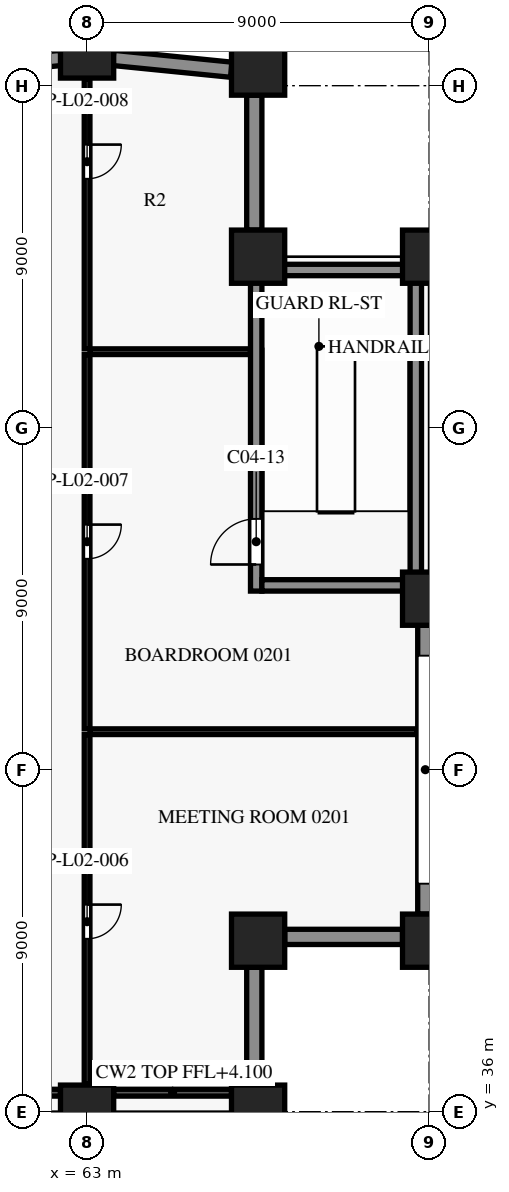
"""IFC4 building model, lengths in metres.
Left out: names, types, materials, properties, quantities, classifications, styles, units other than length and angle.
Written with IfcOpenShell. Run it as: python <this file> out.ifc"""

import sys

from ifc_helpers import new_model, si_unit, direction, frame, frame_2d, origin, origin_2d, place, context, subcontext, project, spatial, rectangle, extrude, element, fill, save


model = new_model("IFC4")
c1 = context("Model", 3, precision=1e-05, world=origin(), true_north=direction((0.0, 1.0)))
c2 = subcontext(c1, "Body", "Model", "MODEL_VIEW")
j1 = project(units=[si_unit("LENGTHUNIT", "METRE"), si_unit("PLANEANGLEUNIT", "RADIAN")], contexts=[c1])
p1 = place(None, origin())
s1 = spatial("IfcSite", under=j1, at=p1, CompositionType="ELEMENT")
p2 = place(p1, origin())
s2 = spatial("IfcBuilding", under=s1, at=p2, CompositionType="ELEMENT")
p3 = place(p2, frame((0.0, 0.0, 14.5)))
s3 = spatial("IfcBuildingStorey", under=s2, at=p3, CompositionType="ELEMENT", Elevation=14.5)
for number, where, z_axis, x_axis in (
    (1, (63.0, 36.0, 0.0), (0.0, 0.0, 1.0), (1.0, 0.0, 0.0)),
    (2, (67.5, 36.0, 0.0), (0.0, 0.0, 1.0), (1.0, 0.0, 0.0)),
    (3, (72.0, 40.5, 0.0), (0.0, 0.0, 1.0), (1.0, 0.0, 0.0)),
    (4, (72.0, 49.5, 0.0), (0.0, 0.0, 1.0), (1.0, 0.0, 0.0)),
    (5, (72.0, 58.5, 0.0), (0.0, 0.0, 1.0), (1.0, 0.0, 0.0)),
    (6, (67.5, 63.45, 0.0), (0.0, 0.0, 1.0), (1.0, 0.0, 0.0)),
    (7, (63.0, 63.9, 0.0), (0.0, 0.0, 1.0), (1.0, 0.0, 0.0)),
    (8, (67.5, 40.5, 0.0), (0.0, 0.0, 1.0), (1.0, 0.0, 0.0)),
    (9, (67.5, 58.5, 0.0), (0.0, 0.0, 1.0), (1.0, 0.0, 0.0)),
):
    element("IfcColumn", number, at=place(p3, frame(where, z_axis=z_axis, x_axis=x_axis)), inside=s3, PredefinedType="COLUMN", context=c2, shape_type="SweptSolid", body=[
        extrude(rectangle(XDim=1.4, YDim=1.4, at=origin_2d()), origin(), (0.0, 0.0, 1.0), 5.0),
    ])
for number, where, z_axis, x_axis in (
    (10, (67.4, 39.8, 0.0), (0.0, 0.0, 1.0), (0.0, -1.0, 0.0)),
    (11, (71.3, 40.6, 0.0), (0.0, 0.0, 1.0), (-1.0, 0.0, 0.0)),
):
    element("IfcWall", number, at=place(p3, frame(where, z_axis=z_axis, x_axis=x_axis)), inside=s3, PredefinedType="SOLIDWALL", context=c2, shape_type="SweptSolid", body=[
        extrude(rectangle(XDim=3.1, YDim=0.4, at=frame_2d((1.55, 0.0))), origin(), (0.0, 0.0, 1.0), 4.1),
    ])
p4 = place(p3, frame((71.9, 48.8, 0.0), z_axis=(0.0, 0.0, 1.0), x_axis=(0.0, -1.0, 0.0)))
e12 = element("IfcWall", 12, at=p4, inside=s3, PredefinedType="SOLIDWALL", context=c2, shape_type="SweptSolid", body=[
    extrude(rectangle(XDim=7.6, YDim=0.4, at=frame_2d((3.8, 0.0))), origin(), (0.0, 0.0, 1.0), 4.1),
])
p5 = place(p4, frame((0.8, 0.0, 0.9)))
e13 = element("IfcOpeningElement", 13, at=p5, cuts=e12, PredefinedType="OPENING", context=c2, shape_type="SweptSolid", body=[
    extrude(rectangle(XDim=6.0, YDim=1.8, at=frame_2d((3.0, 0.9))), frame((0.0, 0.21, 0.0), z_axis=(0.0, -1.0, 0.0), x_axis=(1.0, 0.0, 0.0)), (0.0, 0.0, 1.0), 0.42),
])
p6 = place(p3, frame((67.4, 62.75, 0.0), z_axis=(0.0, 0.0, 1.0), x_axis=(0.0, -1.0, 0.0)))
e14 = element("IfcWall", 14, at=p6, inside=s3, PredefinedType="SOLIDWALL", context=c2, shape_type="SweptSolid", body=[
    extrude(rectangle(XDim=3.55, YDim=0.4, at=frame_2d((1.775, 0.0))), origin(), (0.0, 0.0, 1.0), 4.1),
])
p7 = place(p3, frame((63.687, 63.731, 0.0), z_axis=(0.0, 0.0, 1.0), x_axis=(0.995041834057, -0.099457269599, 0.0)))
e15 = element("IfcWall", 15, at=p7, inside=s3, PredefinedType="SOLIDWALL", context=c2, shape_type="SweptSolid", body=[
    extrude(rectangle(XDim=3.122, YDim=0.4, at=frame_2d((1.561, 0.0))), origin(), (0.0, 0.0, 1.0), 4.1),
])
p8 = place(p3, frame((54.707, 62.97, 0.0), z_axis=(0.0, 0.0, 1.0), x_axis=(0.995039719416, 0.099478423711, 0.0)))
e16 = element("IfcWall", 16, at=p8, inside=s3, PredefinedType="SOLIDWALL", context=c2, shape_type="SweptSolid", body=[
    extrude(rectangle(XDim=7.645, YDim=0.4, at=frame_2d((3.822, 0.0))), origin(), (0.0, 0.0, 1.0), 4.1),
])
p9 = place(p8, frame((0.823, 0.0, 0.9)))
e17 = element("IfcOpeningElement", 17, at=p9, cuts=e16, PredefinedType="OPENING", context=c2, shape_type="SweptSolid", body=[
    extrude(rectangle(XDim=6.0, YDim=1.8, at=frame_2d((3.0, 0.9))), frame((0.0, 0.21, 0.0), z_axis=(0.0, -1.0, 0.0), x_axis=(1.0, 0.0, 0.0)), (0.0, 0.0, 1.0), 0.42),
])
for number, where, z_axis, x_axis in (
    (18, (67.6, 49.85, 0.0), (0.0, 0.0, 1.0), (1.0, 0.0, 0.0)),
    (19, (67.6, 58.15, 0.0), (0.0, 0.0, 1.0), (1.0, 0.0, 0.0)),
):
    element("IfcWall", number, at=place(p3, frame(where, z_axis=z_axis, x_axis=x_axis)), inside=s3, PredefinedType="SHEAR", context=c2, shape_type="SweptSolid", body=[
        extrude(rectangle(XDim=3.9, YDim=0.3, at=frame_2d((1.95, 0.0))), origin(), (0.0, 0.0, 1.0), 4.7),
    ])
p10 = place(p3, frame((67.45, 49.7, 0.0), z_axis=(0.0, 0.0, 1.0), x_axis=(0.0, 1.0, 0.0)))
e20 = element("IfcWall", 20, at=p10, inside=s3, PredefinedType="SHEAR", context=c2, shape_type="SweptSolid", body=[
    extrude(rectangle(XDim=8.6, YDim=0.3, at=frame_2d((4.3, 0.0))), origin(), (0.0, 0.0, 1.0), 4.7),
])
p11 = place(p10, frame((0.7, 0.0, 0.0)))
e21 = element("IfcOpeningElement", 21, at=p11, cuts=e20, PredefinedType="OPENING", context=c2, shape_type="SweptSolid", body=[
    extrude(rectangle(XDim=1.2, YDim=2.2, at=frame_2d((0.6, 1.1))), frame((0.0, 0.16, 0.0), z_axis=(0.0, -1.0, 0.0), x_axis=(1.0, 0.0, 0.0)), (0.0, 0.0, 1.0), 0.32),
])
p12 = place(p3, frame((71.65, 49.7, 0.0), z_axis=(0.0, 0.0, 1.0), x_axis=(0.0, 1.0, 0.0)))
e22 = element("IfcWall", 22, at=p12, inside=s3, PredefinedType="SHEAR", context=c2, shape_type="SweptSolid", body=[
    extrude(rectangle(XDim=8.6, YDim=0.3, at=frame_2d((4.3, 0.0))), origin(), (0.0, 0.0, 1.0), 4.7),
])
p13 = place(p3, frame((63.0, 45.925, 0.0), z_axis=(0.0, 0.0, 1.0), x_axis=(0.0, -1.0, 0.0)))
e23 = element("IfcWall", 23, at=p13, inside=s3, PredefinedType="PARTITIONING", context=c2, shape_type="SweptSolid", body=[
    extrude(rectangle(XDim=9.205, YDim=0.15, at=frame_2d((4.603, 0.0))), origin(), (0.0, 0.0, 1.0), 3.98),
])
p14 = place(p13, frame((4.475, 0.0, 0.0)))
e24 = element("IfcOpeningElement", 24, at=p14, cuts=e23, PredefinedType="OPENING", context=c2, shape_type="SweptSolid", body=[
    extrude(rectangle(XDim=0.9, YDim=2.1, at=frame_2d((0.45, 1.05))), frame((0.0, 0.085, 0.0), z_axis=(0.0, -1.0, 0.0), x_axis=(1.0, 0.0, 0.0)), (0.0, 0.0, 1.0), 0.17),
])
p15 = place(p3, frame((63.075, 46.0, 0.0), z_axis=(0.0, 0.0, 1.0), x_axis=(1.0, 0.0, 0.0)))
e25 = element("IfcWall", 25, at=p15, inside=s3, PredefinedType="PARTITIONING", context=c2, shape_type="SweptSolid", body=[
    extrude(rectangle(XDim=8.605, YDim=0.15, at=frame_2d((4.302, 0.0))), origin(), (0.0, 0.0, 1.0), 3.98),
])
p16 = place(p3, frame((63.0, 55.925, 0.0), z_axis=(0.0, 0.0, 1.0), x_axis=(0.0, -1.0, 0.0)))
e26 = element("IfcWall", 26, at=p16, inside=s3, PredefinedType="PARTITIONING", context=c2, shape_type="SweptSolid", body=[
    extrude(rectangle(XDim=9.85, YDim=0.15, at=frame_2d((4.925, 0.0))), origin(), (0.0, 0.0, 1.0), 3.98),
])
p17 = place(p16, frame((4.475, 0.0, 0.0)))
e27 = element("IfcOpeningElement", 27, at=p17, cuts=e26, PredefinedType="OPENING", context=c2, shape_type="SweptSolid", body=[
    extrude(rectangle(XDim=0.9, YDim=2.1, at=frame_2d((0.45, 1.05))), frame((0.0, 0.085, 0.0), z_axis=(0.0, -1.0, 0.0), x_axis=(1.0, 0.0, 0.0)), (0.0, 0.0, 1.0), 0.17),
])
p18 = place(p3, frame((63.075, 56.0, 0.0), z_axis=(0.0, 0.0, 1.0), x_axis=(1.0, 0.0, 0.0)))
e28 = element("IfcWall", 28, at=p18, inside=s3, PredefinedType="PARTITIONING", context=c2, shape_type="SweptSolid", body=[
    extrude(rectangle(XDim=4.225, YDim=0.15, at=frame_2d((2.113, 0.0))), origin(), (0.0, 0.0, 1.0), 3.98),
])
p19 = place(p3, frame((63.0, 63.18, 0.0), z_axis=(0.0, 0.0, 1.0), x_axis=(0.0, -1.0, 0.0)))
e29 = element("IfcWall", 29, at=p19, inside=s3, PredefinedType="PARTITIONING", context=c2, shape_type="SweptSolid", body=[
    extrude(rectangle(XDim=7.105, YDim=0.15, at=frame_2d((3.552, 0.0))), origin(), (0.0, 0.0, 1.0), 3.98),
])
p20 = place(p19, frame((1.73, 0.0, 0.0)))
e30 = element("IfcOpeningElement", 30, at=p20, cuts=e29, PredefinedType="OPENING", context=c2, shape_type="SweptSolid", body=[
    extrude(rectangle(XDim=0.9, YDim=2.1, at=frame_2d((0.45, 1.05))), frame((0.0, 0.085, 0.0), z_axis=(0.0, -1.0, 0.0), x_axis=(1.0, 0.0, 0.0)), (0.0, 0.0, 1.0), 0.17),
])
p21 = place(p5, origin())
e31 = element("IfcWindow", 31, at=p21, inside=s3, PartitioningType="SINGLE_PANEL", PredefinedType="WINDOW", context=c2, shape_type="SweptSolid", body=[
    extrude(rectangle(XDim=6.0, YDim=1.8, at=frame_2d((3.0, 0.9))), frame((0.0, 0.03, 0.0), z_axis=(0.0, -1.0, 0.0), x_axis=(1.0, 0.0, 0.0)), (0.0, 0.0, 1.0), 0.06),
])
fill(e13, e31)
p22 = place(p11, origin())
e32 = element("IfcDoor", 32, at=p22, inside=s3, OperationType="SINGLE_SWING_RIGHT", PredefinedType="DOOR", context=c2, shape_type="SweptSolid", body=[
    extrude(rectangle(XDim=1.2, YDim=2.2, at=frame_2d((0.6, 1.1))), frame((0.0, 0.025, 0.0), z_axis=(0.0, -1.0, 0.0), x_axis=(1.0, 0.0, 0.0)), (0.0, 0.0, 1.0), 0.05),
])
fill(e21, e32)
p23 = place(p14, origin())
e33 = element("IfcDoor", 33, at=p23, inside=s3, OperationType="SINGLE_SWING_LEFT", PredefinedType="DOOR", context=c2, shape_type="SweptSolid", body=[
    extrude(rectangle(XDim=0.9, YDim=2.1, at=frame_2d((0.45, 1.05))), frame((0.0, 0.025, 0.0), z_axis=(0.0, -1.0, 0.0), x_axis=(1.0, 0.0, 0.0)), (0.0, 0.0, 1.0), 0.05),
])
fill(e24, e33)
p24 = place(p17, origin())
e34 = element("IfcDoor", 34, at=p24, inside=s3, OperationType="SINGLE_SWING_RIGHT", PredefinedType="DOOR", context=c2, shape_type="SweptSolid", body=[
    extrude(rectangle(XDim=0.9, YDim=2.1, at=frame_2d((0.45, 1.05))), frame((0.0, 0.025, 0.0), z_axis=(0.0, -1.0, 0.0), x_axis=(1.0, 0.0, 0.0)), (0.0, 0.0, 1.0), 0.05),
])
fill(e27, e34)
p25 = place(p20, origin())
e35 = element("IfcDoor", 35, at=p25, inside=s3, OperationType="SINGLE_SWING_LEFT", PredefinedType="DOOR", context=c2, shape_type="SweptSolid", body=[
    extrude(rectangle(XDim=0.9, YDim=2.1, at=frame_2d((0.45, 1.05))), frame((0.0, 0.025, 0.0), z_axis=(0.0, -1.0, 0.0), x_axis=(1.0, 0.0, 0.0)), (0.0, 0.0, 1.0), 0.05),
])
fill(e30, e35)
save(model, sys.argv[1])
